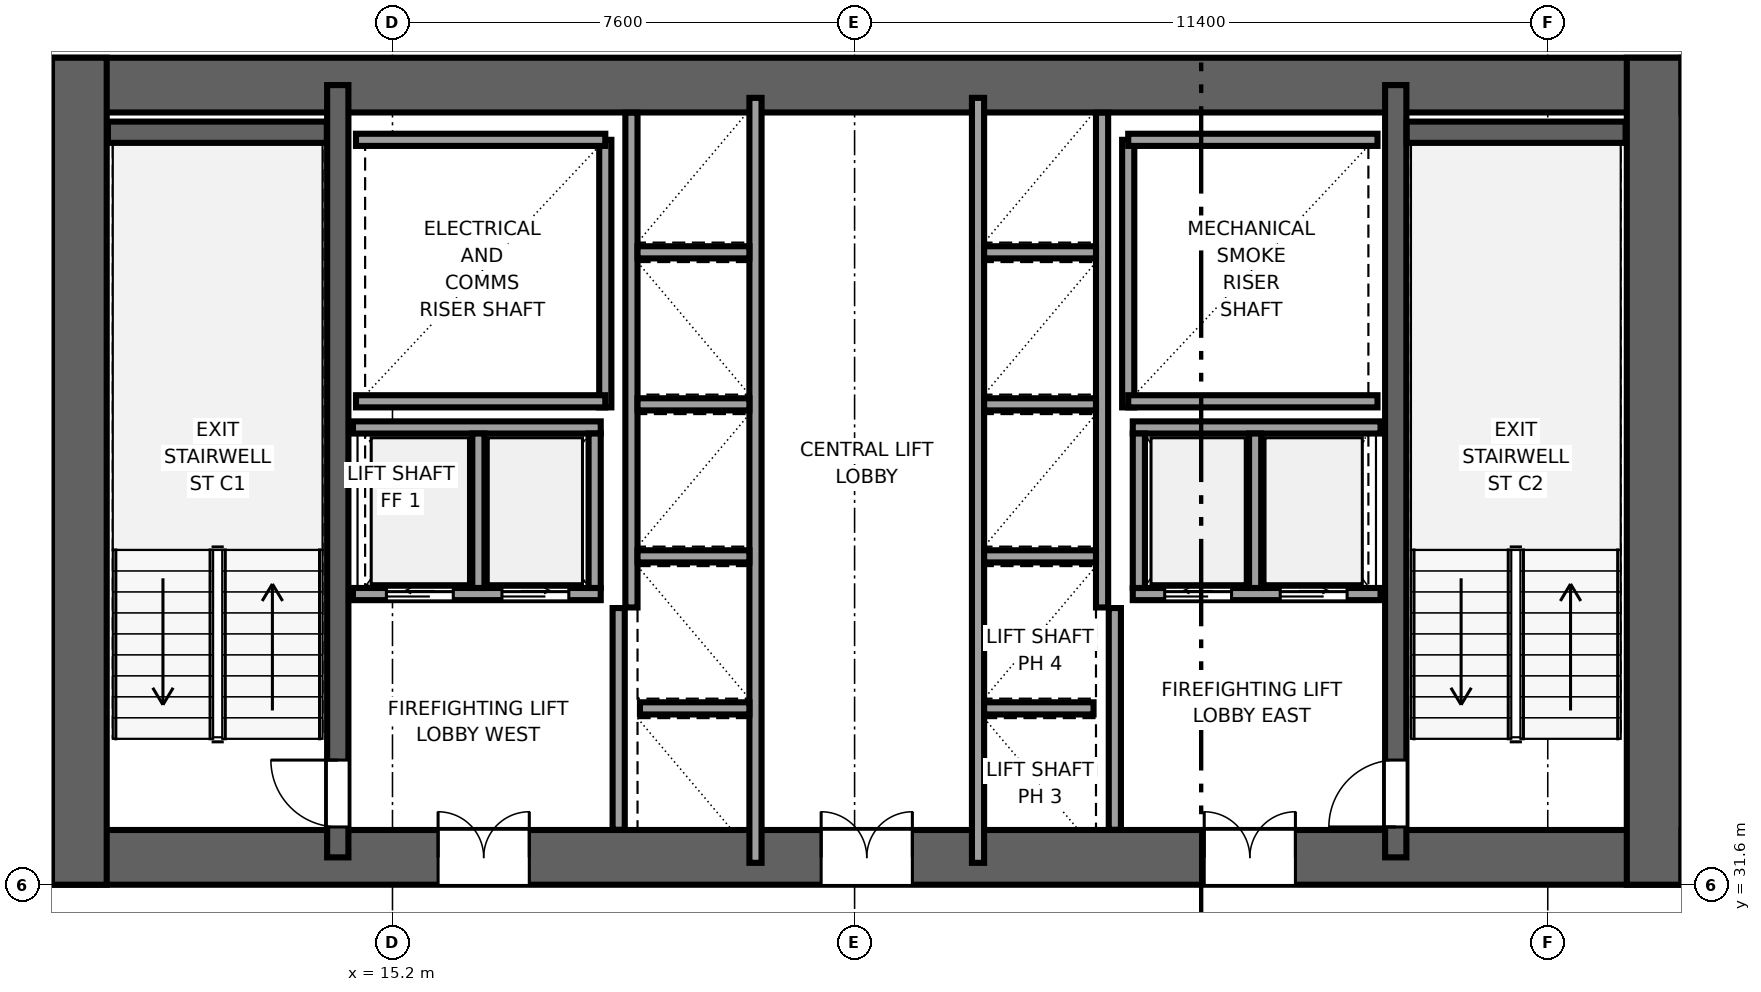
"""IFC4 building model, lengths in metres.
Left out: names, types, materials, properties, quantities, classifications, styles, units other than length and angle.
Written with IfcOpenShell. Run it as: python <this file> out.ifc"""

import sys

from ifc_helpers import new_model, si_unit, direction, frame, frame_2d, origin, place, context, subcontext, project, spatial, rectangle, extrude, source, transform, mapped, element, fill, save


model = new_model("IFC4")
c1 = context("Model", 3, precision=1e-05, world=origin(), true_north=direction((0.0, 1.0)))
c2 = subcontext(c1, "Body", "Model", "MODEL_VIEW")
j1 = project(units=[si_unit("LENGTHUNIT", "METRE"), si_unit("PLANEANGLEUNIT", "RADIAN")], contexts=[c1])
p1 = place(None, origin())
s1 = spatial("IfcSite", under=j1, at=p1, CompositionType="ELEMENT")
p2 = place(p1, origin())
s2 = spatial("IfcBuilding", under=s1, at=p2, CompositionType="ELEMENT")
p3 = place(p2, frame((0.0, 0.0, 42.65)))
s3 = spatial("IfcBuildingStorey", under=s2, at=p3, CompositionType="ELEMENT", Elevation=42.65)
p4 = place(p3, frame((9.6, 32.05, 0.0), z_axis=(0.0, 0.0, 1.0), x_axis=(1.0, 0.0, 0.0)))
e1 = element("IfcWall", 1, at=p4, inside=s3, PredefinedType="SHEAR", context=c2, shape_type="SweptSolid", body=[
    extrude(rectangle(XDim=26.8, YDim=0.9, at=frame_2d((13.4, 0.0))), origin(), (0.0, 0.0, 1.0), 3.55),
])
p5 = place(p4, frame((7.85, 0.0, 0.0), z_axis=(0.0, 0.0, 1.0), x_axis=(-1.0, 0.0, 0.0)))
e2 = element("IfcOpeningElement", 2, at=p5, cuts=e1, PredefinedType="OPENING", context=c2, shape_type="SweptSolid", body=[
    extrude(rectangle(XDim=1.5, YDim=2.04, at=frame_2d((0.75, 1.02))), frame((0.0, 0.46, 0.0), z_axis=(0.0, -1.0, 0.0), x_axis=(1.0, 0.0, 0.0)), (0.0, 0.0, 1.0), 0.92),
])
p6 = place(p4, frame((14.15, 0.0, 0.0), z_axis=(0.0, 0.0, 1.0), x_axis=(-1.0, 0.0, 0.0)))
e3 = element("IfcOpeningElement", 3, at=p6, cuts=e1, PredefinedType="OPENING", context=c2, shape_type="SweptSolid", body=[
    extrude(rectangle(XDim=1.5, YDim=2.04, at=frame_2d((0.75, 1.02))), frame((0.0, 0.46, 0.0), z_axis=(0.0, -1.0, 0.0), x_axis=(1.0, 0.0, 0.0)), (0.0, 0.0, 1.0), 0.92),
])
p7 = place(p4, frame((20.45, 0.0, 0.0), z_axis=(0.0, 0.0, 1.0), x_axis=(-1.0, 0.0, 0.0)))
e4 = element("IfcOpeningElement", 4, at=p7, cuts=e1, PredefinedType="OPENING", context=c2, shape_type="SweptSolid", body=[
    extrude(rectangle(XDim=1.5, YDim=2.04, at=frame_2d((0.75, 1.02))), frame((0.0, 0.46, 0.0), z_axis=(0.0, -1.0, 0.0), x_axis=(1.0, 0.0, 0.0)), (0.0, 0.0, 1.0), 0.92),
])
p8 = place(p3, frame((9.6, 44.75, 0.0), z_axis=(0.0, 0.0, 1.0), x_axis=(1.0, 0.0, 0.0)))
e5 = element("IfcWall", 5, at=p8, inside=s3, PredefinedType="SHEAR", context=c2, shape_type="SweptSolid", body=[
    extrude(rectangle(XDim=26.8, YDim=0.9, at=frame_2d((13.4, 0.0))), origin(), (0.0, 0.0, 1.0), 3.55),
])
for number, where, z_axis, x_axis in (
    (6, (10.05, 31.6, 0.0), (0.0, 0.0, 1.0), (0.0, 1.0, 0.0)),
    (7, (35.95, 31.6, 0.0), (0.0, 0.0, 1.0), (0.0, 1.0, 0.0)),
):
    element("IfcWall", number, at=place(p3, frame(where, z_axis=z_axis, x_axis=x_axis)), inside=s3, PredefinedType="SHEAR", context=c2, shape_type="SweptSolid", body=[
        extrude(rectangle(XDim=13.6, YDim=0.9, at=frame_2d((6.8, 0.0))), origin(), (0.0, 0.0, 1.0), 3.55),
    ])
p9 = place(p3, frame((14.3, 32.05, 0.0), z_axis=(0.0, 0.0, 1.0), x_axis=(0.0, 1.0, 0.0)))
e8 = element("IfcWall", 8, at=p9, inside=s3, PredefinedType="SHEAR", context=c2, shape_type="SweptSolid", body=[
    extrude(rectangle(XDim=12.7, YDim=0.35, at=frame_2d((6.35, 0.0))), origin(), (0.0, 0.0, 1.0), 3.55),
])
p10 = place(p9, frame((0.5, 0.0, 0.0)))
e9 = element("IfcOpeningElement", 9, at=p10, cuts=e8, PredefinedType="OPENING", context=c2, shape_type="SweptSolid", body=[
    extrude(rectangle(XDim=1.1, YDim=2.12, at=frame_2d((0.55, 1.06))), frame((0.0, 0.185, 0.0), z_axis=(0.0, -1.0, 0.0), x_axis=(1.0, 0.0, 0.0)), (0.0, 0.0, 1.0), 0.37),
])
p11 = place(p3, frame((31.7, 32.05, 0.0), z_axis=(0.0, 0.0, 1.0), x_axis=(0.0, 1.0, 0.0)))
e10 = element("IfcWall", 10, at=p11, inside=s3, PredefinedType="SHEAR", context=c2, shape_type="SweptSolid", body=[
    extrude(rectangle(XDim=12.7, YDim=0.35, at=frame_2d((6.35, 0.0))), origin(), (0.0, 0.0, 1.0), 3.55),
])
p12 = place(p11, frame((1.6, 0.0, 0.0), z_axis=(0.0, 0.0, 1.0), x_axis=(-1.0, 0.0, 0.0)))
e11 = element("IfcOpeningElement", 11, at=p12, cuts=e10, PredefinedType="OPENING", context=c2, shape_type="SweptSolid", body=[
    extrude(rectangle(XDim=1.1, YDim=2.12, at=frame_2d((0.55, 1.06))), frame((0.0, 0.185, 0.0), z_axis=(0.0, -1.0, 0.0), x_axis=(1.0, 0.0, 0.0)), (0.0, 0.0, 1.0), 0.37),
])
for number, where, z_axis, x_axis in (
    (12, (10.52, 43.975, 0.0), (0.0, 0.0, 1.0), (1.0, 0.0, 0.0)),
    (13, (31.88, 43.975, 0.0), (0.0, 0.0, 1.0), (1.0, 0.0, 0.0)),
):
    element("IfcWall", number, at=place(p3, frame(where, z_axis=z_axis, x_axis=x_axis)), inside=s3, PredefinedType="SHEAR", context=c2, shape_type="SweptSolid", body=[
        extrude(rectangle(XDim=3.6, YDim=0.35, at=frame_2d((1.8, 0.0))), origin(), (0.0, 0.0, 1.0), 3.55),
    ])
p13 = place(p3, frame((18.7, 39.45, 0.0), z_axis=(0.0, 0.0, 1.0), x_axis=(0.0, 1.0, 0.0)))
e14 = element("IfcWall", 14, at=p13, inside=s3, PredefinedType="SOLIDWALL", context=c2, shape_type="SweptSolid", body=[
    extrude(rectangle(XDim=4.4, YDim=0.2, at=frame_2d((2.2, 0.0))), origin(), (0.0, 0.0, 1.0), 3.37),
])
for number, where, z_axis, x_axis in (
    (15, (14.6, 39.55, 0.0), (0.0, 0.0, 1.0), (1.0, 0.0, 0.0)),
    (16, (14.6, 43.85, 0.0), (0.0, 0.0, 1.0), (1.0, 0.0, 0.0)),
):
    element("IfcWall", number, at=place(p3, frame(where, z_axis=z_axis, x_axis=x_axis)), inside=s3, PredefinedType="SOLIDWALL", context=c2, shape_type="SweptSolid", body=[
        extrude(rectangle(XDim=4.1, YDim=0.2, at=frame_2d((2.05, 0.0))), origin(), (0.0, 0.0, 1.0), 3.37),
    ])
p14 = place(p3, frame((27.3, 39.45, 0.0), z_axis=(0.0, 0.0, 1.0), x_axis=(0.0, 1.0, 0.0)))
e17 = element("IfcWall", 17, at=p14, inside=s3, PredefinedType="SOLIDWALL", context=c2, shape_type="SweptSolid", body=[
    extrude(rectangle(XDim=4.4, YDim=0.2, at=frame_2d((2.2, 0.0))), origin(), (0.0, 0.0, 1.0), 3.37),
])
for number, where, z_axis, x_axis in (
    (18, (27.3, 39.55, 0.0), (0.0, 0.0, 1.0), (1.0, 0.0, 0.0)),
    (19, (27.3, 43.85, 0.0), (0.0, 0.0, 1.0), (1.0, 0.0, 0.0)),
):
    element("IfcWall", number, at=place(p3, frame(where, z_axis=z_axis, x_axis=x_axis)), inside=s3, PredefinedType="SOLIDWALL", context=c2, shape_type="SweptSolid", body=[
        extrude(rectangle(XDim=4.1, YDim=0.2, at=frame_2d((2.05, 0.0))), origin(), (0.0, 0.0, 1.0), 3.37),
    ])
for number, where, z_axis, x_axis in (
    (20, (18.92, 32.504, 0.0), (0.0, 0.0, 1.0), (0.0, 1.0, 0.0)),
    (21, (27.08, 32.504, 0.0), (0.0, 0.0, 1.0), (0.0, 1.0, 0.0)),
):
    element("IfcWall", number, at=place(p3, frame(where, z_axis=z_axis, x_axis=x_axis)), inside=s3, PredefinedType="SOLIDWALL", context=c2, shape_type="SweptSolid", body=[
        extrude(rectangle(XDim=3.646, YDim=0.2, at=frame_2d((1.823, 0.0))), origin(), (0.0, 0.0, 1.0), 3.37),
    ])
p15 = place(p3, frame((21.17, 31.96, 0.0), z_axis=(0.0, 0.0, 1.0), x_axis=(0.0, 1.0, 0.0)))
e22 = element("IfcWall", 22, at=p15, inside=s3, PredefinedType="SOLIDWALL", context=c2, shape_type="SweptSolid", body=[
    extrude(rectangle(XDim=12.58, YDim=0.2, at=frame_2d((6.29, 0.0))), origin(), (0.0, 0.0, 1.0), 3.37),
])
p16 = place(p3, frame((19.13, 36.16, 0.0), z_axis=(0.0, 0.0, 1.0), x_axis=(0.0, 1.0, 0.0)))
e23 = element("IfcWall", 23, at=p16, inside=s3, PredefinedType="SOLIDWALL", context=c2, shape_type="SweptSolid", body=[
    extrude(rectangle(XDim=8.136, YDim=0.2, at=frame_2d((4.068, 0.0))), origin(), (0.0, 0.0, 1.0), 3.37),
])
p17 = place(p3, frame((19.27, 34.5, 0.0), z_axis=(0.0, 0.0, 1.0), x_axis=(1.0, 0.0, 0.0)))
e24 = element("IfcWall", 24, at=p17, inside=s3, PredefinedType="SOLIDWALL", context=c2, shape_type="SweptSolid", body=[
    extrude(rectangle(XDim=1.8, YDim=0.2, at=frame_2d((0.9, 0.0))), origin(), (0.0, 0.0, 1.0), 3.37),
])
for number, where, z_axis, x_axis in (
    (25, (19.23, 37.0, 0.0), (0.0, 0.0, 1.0), (1.0, 0.0, 0.0)),
    (26, (19.23, 39.5, 0.0), (0.0, 0.0, 1.0), (1.0, 0.0, 0.0)),
    (27, (19.23, 42.0, 0.0), (0.0, 0.0, 1.0), (1.0, 0.0, 0.0)),
):
    element("IfcWall", number, at=place(p3, frame(where, z_axis=z_axis, x_axis=x_axis)), inside=s3, PredefinedType="SOLIDWALL", context=c2, shape_type="SweptSolid", body=[
        extrude(rectangle(XDim=1.84, YDim=0.2, at=frame_2d((0.92, 0.0))), origin(), (0.0, 0.0, 1.0), 3.37),
    ])
p18 = place(p3, frame((27.375, 36.38, 0.0), z_axis=(0.0, 0.0, 1.0), x_axis=(1.0, 0.0, 0.0)))
e28 = element("IfcWall", 28, at=p18, inside=s3, PredefinedType="SOLIDWALL", context=c2, shape_type="SweptSolid", body=[
    extrude(rectangle(XDim=4.075, YDim=0.2, at=frame_2d((2.038, 0.0))), origin(), (0.0, 0.0, 1.0), 3.37),
])
p19 = place(p18, frame((0.525, 0.0, 0.0)))
e29 = element("IfcOpeningElement", 29, at=p19, cuts=e28, PredefinedType="OPENING", context=c2, shape_type="SweptSolid", body=[
    extrude(rectangle(XDim=1.1, YDim=2.12, at=frame_2d((0.55, 1.06))), frame((0.0, 0.11, 0.0), z_axis=(0.0, -1.0, 0.0), x_axis=(1.0, 0.0, 0.0)), (0.0, 0.0, 1.0), 0.22),
])
p20 = place(p18, frame((2.425, 0.0, 0.0)))
e30 = element("IfcOpeningElement", 30, at=p20, cuts=e28, PredefinedType="OPENING", context=c2, shape_type="SweptSolid", body=[
    extrude(rectangle(XDim=1.1, YDim=2.12, at=frame_2d((0.55, 1.06))), frame((0.0, 0.11, 0.0), z_axis=(0.0, -1.0, 0.0), x_axis=(1.0, 0.0, 0.0)), (0.0, 0.0, 1.0), 0.22),
])
p21 = place(p3, frame((27.375, 39.12, 0.0), z_axis=(0.0, 0.0, 1.0), x_axis=(1.0, 0.0, 0.0)))
e31 = element("IfcWall", 31, at=p21, inside=s3, PredefinedType="SOLIDWALL", context=c2, shape_type="SweptSolid", body=[
    extrude(rectangle(XDim=4.075, YDim=0.2, at=frame_2d((2.038, 0.0))), origin(), (0.0, 0.0, 1.0), 3.37),
])
for number, where, z_axis, x_axis in (
    (32, (27.475, 36.48, 0.0), (0.0, 0.0, 1.0), (0.0, 1.0, 0.0)),
    (33, (29.387, 36.48, 0.0), (0.0, 0.0, 1.0), (0.0, 1.0, 0.0)),
):
    element("IfcWall", number, at=place(p3, frame(where, z_axis=z_axis, x_axis=x_axis)), inside=s3, PredefinedType="SOLIDWALL", context=c2, shape_type="SweptSolid", body=[
        extrude(rectangle(XDim=2.54, YDim=0.2, at=frame_2d((1.27, 0.0))), origin(), (0.0, 0.0, 1.0), 3.37),
    ])
p22 = place(p3, frame((14.55, 36.38, 0.0), z_axis=(0.0, 0.0, 1.0), x_axis=(1.0, 0.0, 0.0)))
e34 = element("IfcWall", 34, at=p22, inside=s3, PredefinedType="SOLIDWALL", context=c2, shape_type="SweptSolid", body=[
    extrude(rectangle(XDim=4.075, YDim=0.2, at=frame_2d((2.038, 0.0))), origin(), (0.0, 0.0, 1.0), 3.37),
])
p23 = place(p22, frame((0.55, 0.0, 0.0)))
e35 = element("IfcOpeningElement", 35, at=p23, cuts=e34, PredefinedType="OPENING", context=c2, shape_type="SweptSolid", body=[
    extrude(rectangle(XDim=1.1, YDim=2.12, at=frame_2d((0.55, 1.06))), frame((0.0, 0.11, 0.0), z_axis=(0.0, -1.0, 0.0), x_axis=(1.0, 0.0, 0.0)), (0.0, 0.0, 1.0), 0.22),
])
p24 = place(p22, frame((2.45, 0.0, 0.0)))
e36 = element("IfcOpeningElement", 36, at=p24, cuts=e34, PredefinedType="OPENING", context=c2, shape_type="SweptSolid", body=[
    extrude(rectangle(XDim=1.1, YDim=2.12, at=frame_2d((0.55, 1.06))), frame((0.0, 0.11, 0.0), z_axis=(0.0, -1.0, 0.0), x_axis=(1.0, 0.0, 0.0)), (0.0, 0.0, 1.0), 0.22),
])
p25 = place(p3, frame((14.55, 39.12, 0.0), z_axis=(0.0, 0.0, 1.0), x_axis=(1.0, 0.0, 0.0)))
e37 = element("IfcWall", 37, at=p25, inside=s3, PredefinedType="SOLIDWALL", context=c2, shape_type="SweptSolid", body=[
    extrude(rectangle(XDim=4.075, YDim=0.2, at=frame_2d((2.038, 0.0))), origin(), (0.0, 0.0, 1.0), 3.37),
])
for number, where, z_axis, x_axis in (
    (38, (18.525, 36.48, 0.0), (0.0, 0.0, 1.0), (0.0, 1.0, 0.0)),
    (39, (16.613, 36.48, 0.0), (0.0, 0.0, 1.0), (0.0, 1.0, 0.0)),
):
    element("IfcWall", number, at=place(p3, frame(where, z_axis=z_axis, x_axis=x_axis)), inside=s3, PredefinedType="SOLIDWALL", context=c2, shape_type="SweptSolid", body=[
        extrude(rectangle(XDim=2.54, YDim=0.2, at=frame_2d((1.27, 0.0))), origin(), (0.0, 0.0, 1.0), 3.37),
    ])
p26 = place(p3, frame((24.83, 31.96, 0.0), z_axis=(0.0, 0.0, 1.0), x_axis=(0.0, 1.0, 0.0)))
e40 = element("IfcWall", 40, at=p26, inside=s3, PredefinedType="SOLIDWALL", context=c2, shape_type="SweptSolid", body=[
    extrude(rectangle(XDim=12.58, YDim=0.2, at=frame_2d((6.29, 0.0))), origin(), (0.0, 0.0, 1.0), 3.37),
])
p27 = place(p3, frame((26.87, 36.16, 0.0), z_axis=(0.0, 0.0, 1.0), x_axis=(0.0, 1.0, 0.0)))
e41 = element("IfcWall", 41, at=p27, inside=s3, PredefinedType="SOLIDWALL", context=c2, shape_type="SweptSolid", body=[
    extrude(rectangle(XDim=8.136, YDim=0.2, at=frame_2d((4.068, 0.0))), origin(), (0.0, 0.0, 1.0), 3.37),
])
p28 = place(p3, frame((24.93, 34.5, 0.0), z_axis=(0.0, 0.0, 1.0), x_axis=(1.0, 0.0, 0.0)))
e42 = element("IfcWall", 42, at=p28, inside=s3, PredefinedType="SOLIDWALL", context=c2, shape_type="SweptSolid", body=[
    extrude(rectangle(XDim=1.8, YDim=0.2, at=frame_2d((0.9, 0.0))), origin(), (0.0, 0.0, 1.0), 3.37),
])
for number, where, z_axis, x_axis in (
    (43, (24.93, 37.0, 0.0), (0.0, 0.0, 1.0), (1.0, 0.0, 0.0)),
    (44, (24.93, 39.5, 0.0), (0.0, 0.0, 1.0), (1.0, 0.0, 0.0)),
    (45, (24.93, 42.0, 0.0), (0.0, 0.0, 1.0), (1.0, 0.0, 0.0)),
):
    element("IfcWall", number, at=place(p3, frame(where, z_axis=z_axis, x_axis=x_axis)), inside=s3, PredefinedType="SOLIDWALL", context=c2, shape_type="SweptSolid", body=[
        extrude(rectangle(XDim=1.84, YDim=0.2, at=frame_2d((0.92, 0.0))), origin(), (0.0, 0.0, 1.0), 3.37),
    ])
m1 = source(origin(), c2, "Body", "SweptSolid", [
    extrude(rectangle(XDim=1.1, YDim=2.12, at=frame_2d((0.55, 1.06))), frame((0.0, 0.025, 0.0), z_axis=(0.0, -1.0, 0.0), x_axis=(1.0, 0.0, 0.0)), (0.0, 0.0, 1.0), 0.05),
])
p29 = place(p10, origin())
e46 = element("IfcDoor", 46, at=p29, inside=s3, OperationType="SINGLE_SWING_RIGHT", PredefinedType="DOOR", context=c2, shape_type="MappedRepresentation", body=[
    mapped(m1, transform((0.0, 0.0, 0.0), x_axis=(1.0, 0.0, 0.0), y_axis=(0.0, 1.0, 0.0), z_axis=(0.0, 0.0, 1.0), scale=1.0)),
])
fill(e9, e46)
p30 = place(p12, origin())
e47 = element("IfcDoor", 47, at=p30, inside=s3, OperationType="SINGLE_SWING_LEFT", PredefinedType="DOOR", context=c2, shape_type="MappedRepresentation", body=[
    mapped(m1, transform((0.0, 0.0, 0.0), x_axis=(1.0, 0.0, 0.0), y_axis=(0.0, 1.0, 0.0), z_axis=(0.0, 0.0, 1.0), scale=1.0)),
])
fill(e11, e47)
m2 = source(origin(), c2, "Body", "SweptSolid", [
    extrude(rectangle(XDim=1.5, YDim=2.04, at=frame_2d((0.75, 1.02))), frame((0.0, 0.025, 0.0), z_axis=(0.0, -1.0, 0.0), x_axis=(1.0, 0.0, 0.0)), (0.0, 0.0, 1.0), 0.05),
])
p31 = place(p5, origin())
e48 = element("IfcDoor", 48, at=p31, inside=s3, OperationType="DOUBLE_DOOR_SINGLE_SWING", PredefinedType="DOOR", context=c2, shape_type="MappedRepresentation", body=[
    mapped(m2, transform((0.0, 0.0, 0.0), x_axis=(1.0, 0.0, 0.0), y_axis=(0.0, 1.0, 0.0), z_axis=(0.0, 0.0, 1.0), scale=1.0)),
])
fill(e2, e48)
p32 = place(p6, origin())
e49 = element("IfcDoor", 49, at=p32, inside=s3, OperationType="DOUBLE_DOOR_SINGLE_SWING", PredefinedType="DOOR", context=c2, shape_type="MappedRepresentation", body=[
    mapped(m2, transform((0.0, 0.0, 0.0), x_axis=(1.0, 0.0, 0.0), y_axis=(0.0, 1.0, 0.0), z_axis=(0.0, 0.0, 1.0), scale=1.0)),
])
fill(e3, e49)
p33 = place(p7, origin())
e50 = element("IfcDoor", 50, at=p33, inside=s3, OperationType="DOUBLE_DOOR_SINGLE_SWING", PredefinedType="DOOR", context=c2, shape_type="MappedRepresentation", body=[
    mapped(m2, transform((0.0, 0.0, 0.0), x_axis=(1.0, 0.0, 0.0), y_axis=(0.0, 1.0, 0.0), z_axis=(0.0, 0.0, 1.0), scale=1.0)),
])
fill(e4, e50)
m3 = source(origin(), c2, "Body", "SweptSolid", [
    extrude(rectangle(XDim=1.1, YDim=2.12, at=frame_2d((0.55, 1.06))), frame((0.0, 0.025, 0.0), z_axis=(0.0, -1.0, 0.0), x_axis=(1.0, 0.0, 0.0)), (0.0, 0.0, 1.0), 0.05),
])
p34 = place(p19, origin())
e51 = element("IfcDoor", 51, at=p34, inside=s3, OperationType="SLIDING_TO_LEFT", PredefinedType="DOOR", context=c2, shape_type="MappedRepresentation", body=[
    mapped(m3, transform((0.0, 0.0, 0.0), x_axis=(1.0, 0.0, 0.0), y_axis=(0.0, 1.0, 0.0), z_axis=(0.0, 0.0, 1.0), scale=1.0)),
])
fill(e29, e51)
p35 = place(p20, origin())
e52 = element("IfcDoor", 52, at=p35, inside=s3, OperationType="SLIDING_TO_RIGHT", PredefinedType="DOOR", context=c2, shape_type="MappedRepresentation", body=[
    mapped(m3, transform((0.0, 0.0, 0.0), x_axis=(1.0, 0.0, 0.0), y_axis=(0.0, 1.0, 0.0), z_axis=(0.0, 0.0, 1.0), scale=1.0)),
])
fill(e30, e52)
p36 = place(p23, origin())
e53 = element("IfcDoor", 53, at=p36, inside=s3, OperationType="SLIDING_TO_LEFT", PredefinedType="DOOR", context=c2, shape_type="MappedRepresentation", body=[
    mapped(m3, transform((0.0, 0.0, 0.0), x_axis=(1.0, 0.0, 0.0), y_axis=(0.0, 1.0, 0.0), z_axis=(0.0, 0.0, 1.0), scale=1.0)),
])
fill(e35, e53)
p37 = place(p24, origin())
e54 = element("IfcDoor", 54, at=p37, inside=s3, OperationType="SLIDING_TO_RIGHT", PredefinedType="DOOR", context=c2, shape_type="MappedRepresentation", body=[
    mapped(m3, transform((0.0, 0.0, 0.0), x_axis=(1.0, 0.0, 0.0), y_axis=(0.0, 1.0, 0.0), z_axis=(0.0, 0.0, 1.0), scale=1.0)),
])
fill(e36, e54)
save(model, sys.argv[1])
